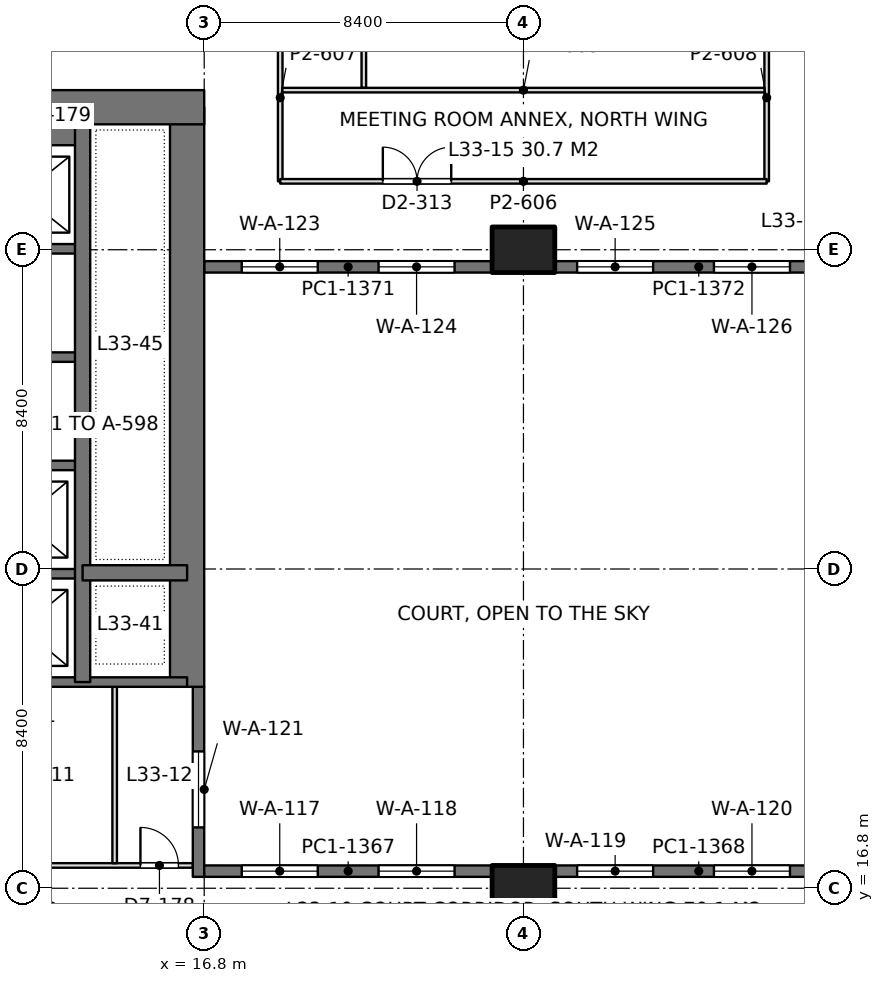
"""IFC4 building model, lengths in metres.
Left out: names, types, materials, properties, quantities, classifications, styles, units other than length and angle.
Written with IfcOpenShell. Run it as: python <this file> out.ifc"""

import sys

from ifc_helpers import new_model, si_unit, direction, frame, frame_2d, origin, origin_2d, place, context, subcontext, project, spatial, rectangle, extrude, element, fill, save


model = new_model("IFC4")
c1 = context("Model", 3, precision=1e-05, world=origin(), true_north=direction((0.0, 1.0)))
c2 = subcontext(c1, "Body", "Model", "MODEL_VIEW")
j1 = project(units=[si_unit("LENGTHUNIT", "METRE"), si_unit("PLANEANGLEUNIT", "RADIAN")], contexts=[c1])
p1 = place(None, origin())
s1 = spatial("IfcSite", under=j1, at=p1, CompositionType="ELEMENT")
p2 = place(p1, origin())
s2 = spatial("IfcBuilding", under=s1, at=p2, CompositionType="ELEMENT")
p3 = place(p2, frame((0.0, 0.0, 147.0)))
s3 = spatial("IfcBuildingStorey", under=s2, at=p3, CompositionType="ELEMENT", Elevation=147.0)
for number, where, z_axis, x_axis in (
    (1, (25.2, 16.8, 0.0), (0.0, 0.0, 1.0), (1.0, 0.0, 0.0)),
    (2, (25.2, 33.6, 0.0), (0.0, 0.0, 1.0), (1.0, 0.0, 0.0)),
):
    element("IfcColumn", number, at=place(p3, frame(where, z_axis=z_axis, x_axis=x_axis)), inside=s3, PredefinedType="COLUMN", context=c2, shape_type="SweptSolid", body=[
        extrude(rectangle(XDim=1.65, YDim=1.2, at=origin_2d()), origin(), (0.0, 0.0, 1.0), 4.2),
    ])
p4 = place(p3, frame((-1.2, 37.35, 0.0), z_axis=(0.0, 0.0, 1.0), x_axis=(1.0, 0.0, 0.0)))
e3 = element("IfcWall", 3, at=p4, inside=s3, PredefinedType="SHEAR", context=c2, shape_type="SweptSolid", body=[
    extrude(rectangle(XDim=18.0, YDim=0.9, at=frame_2d((9.0, 0.0))), origin(), (0.0, 0.0, 1.0), 4.2),
])
p5 = place(p4, frame((8.95, 0.0, 0.0)))
e4 = element("IfcOpeningElement", 4, at=p5, cuts=e3, PredefinedType="OPENING", context=c2, shape_type="SweptSolid", body=[
    extrude(rectangle(XDim=1.8, YDim=2.4, at=frame_2d((0.9, 1.2))), frame((0.0, 0.46, 0.0), z_axis=(0.0, -1.0, 0.0), x_axis=(1.0, 0.0, 0.0)), (0.0, 0.0, 1.0), 0.92),
])
p6 = place(p3, frame((16.35, 22.1, 0.0), z_axis=(0.0, 0.0, 1.0), x_axis=(0.0, 1.0, 0.0)))
e5 = element("IfcWall", 5, at=p6, inside=s3, PredefinedType="SHEAR", context=c2, shape_type="SweptSolid", body=[
    extrude(rectangle(XDim=15.25, YDim=0.9, at=frame_2d((7.625, 0.0))), origin(), (0.0, 0.0, 1.0), 4.2),
])
p7 = place(p3, frame((13.6, 22.225, 0.0), z_axis=(0.0, 0.0, 1.0), x_axis=(0.0, 1.0, 0.0)))
e6 = element("IfcWall", 6, at=p7, inside=s3, PredefinedType="SHEAR", context=c2, shape_type="SweptSolid", body=[
    extrude(rectangle(XDim=15.125, YDim=0.4, at=frame_2d((7.562, 0.0))), origin(), (0.0, 0.0, 1.0), 4.2),
])
p8 = place(p3, frame((13.6, 25.1, 0.0), z_axis=(0.0, 0.0, 1.0), x_axis=(1.0, 0.0, 0.0)))
e7 = element("IfcWall", 7, at=p8, inside=s3, PredefinedType="SHEAR", context=c2, shape_type="SweptSolid", body=[
    extrude(rectangle(XDim=2.75, YDim=0.4, at=frame_2d((1.375, 0.0))), origin(), (0.0, 0.0, 1.0), 4.2),
])
p9 = place(p3, frame((10.4, 22.225, 0.0), z_axis=(0.0, 0.0, 1.0), x_axis=(1.0, 0.0, 0.0)))
e8 = element("IfcWall", 8, at=p9, inside=s3, PredefinedType="SHEAR", context=c2, shape_type="SweptSolid", body=[
    extrude(rectangle(XDim=5.95, YDim=0.25, at=frame_2d((2.975, 0.0))), origin(), (0.0, 0.0, 1.0), 4.2),
])
for number, where, z_axis, x_axis in (
    (9, (10.4, 25.075, 0.0), (0.0, 0.0, 1.0), (1.0, 0.0, 0.0)),
    (10, (10.4, 27.925, 0.0), (0.0, 0.0, 1.0), (1.0, 0.0, 0.0)),
    (11, (10.4, 30.775, 0.0), (0.0, 0.0, 1.0), (1.0, 0.0, 0.0)),
    (12, (10.4, 33.625, 0.0), (0.0, 0.0, 1.0), (1.0, 0.0, 0.0)),
):
    element("IfcWall", number, at=place(p3, frame(where, z_axis=z_axis, x_axis=x_axis)), inside=s3, PredefinedType="SHEAR", context=c2, shape_type="SweptSolid", body=[
        extrude(rectangle(XDim=3.2, YDim=0.25, at=frame_2d((1.6, 0.0))), origin(), (0.0, 0.0, 1.0), 4.2),
    ])
p10 = place(p3, frame((10.4, 36.625, 0.0), z_axis=(0.0, 0.0, 1.0), x_axis=(1.0, 0.0, 0.0)))
e13 = element("IfcWall", 13, at=p10, inside=s3, PredefinedType="SHEAR", context=c2, shape_type="SweptSolid", body=[
    extrude(rectangle(XDim=3.2, YDim=0.55, at=frame_2d((1.6, 0.0))), origin(), (0.0, 0.0, 1.0), 4.2),
])
p11 = place(p3, frame((16.65, 17.1, 0.0), z_axis=(0.0, 0.0, 1.0), x_axis=(0.0, 1.0, 0.0)))
e14 = element("IfcWall", 14, at=p11, inside=s3, PredefinedType="SOLIDWALL", context=c2, shape_type="SweptSolid", body=[
    extrude(rectangle(XDim=5.0, YDim=0.3, at=frame_2d((2.5, 0.0))), origin(), (0.0, 0.0, 1.0), 4.05),
])
p12 = place(p11, frame((1.3, 0.0, 0.1)))
e15 = element("IfcOpeningElement", 15, at=p12, cuts=e14, PredefinedType="OPENING", context=c2, shape_type="SweptSolid", body=[
    extrude(rectangle(XDim=2.0, YDim=3.0, at=frame_2d((1.0, 1.5))), frame((0.0, 0.16, 0.0), z_axis=(0.0, -1.0, 0.0), x_axis=(1.0, 0.0, 0.0)), (0.0, 0.0, 1.0), 0.32),
])
p13 = place(p3, frame((16.8, 17.25, 0.0), z_axis=(0.0, 0.0, 1.0), x_axis=(1.0, 0.0, 0.0)))
e16 = element("IfcWall", 16, at=p13, inside=s3, PredefinedType="SOLIDWALL", context=c2, shape_type="SweptSolid", body=[
    extrude(rectangle(XDim=7.575, YDim=0.3, at=frame_2d((3.788, 0.0))), origin(), (0.0, 0.0, 1.0), 4.05),
])
p14 = place(p13, frame((0.988, 0.0, 0.1)))
e17 = element("IfcOpeningElement", 17, at=p14, cuts=e16, PredefinedType="OPENING", context=c2, shape_type="SweptSolid", body=[
    extrude(rectangle(XDim=2.0, YDim=3.0, at=frame_2d((1.0, 1.5))), frame((0.0, 0.16, 0.0), z_axis=(0.0, -1.0, 0.0), x_axis=(1.0, 0.0, 0.0)), (0.0, 0.0, 1.0), 0.32),
])
p15 = place(p13, frame((4.587, 0.0, 0.1)))
e18 = element("IfcOpeningElement", 18, at=p15, cuts=e16, PredefinedType="OPENING", context=c2, shape_type="SweptSolid", body=[
    extrude(rectangle(XDim=2.0, YDim=3.0, at=frame_2d((1.0, 1.5))), frame((0.0, 0.16, 0.0), z_axis=(0.0, -1.0, 0.0), x_axis=(1.0, 0.0, 0.0)), (0.0, 0.0, 1.0), 0.32),
])
p16 = place(p3, frame((26.025, 17.25, 0.0), z_axis=(0.0, 0.0, 1.0), x_axis=(1.0, 0.0, 0.0)))
e19 = element("IfcWall", 19, at=p16, inside=s3, PredefinedType="SOLIDWALL", context=c2, shape_type="SweptSolid", body=[
    extrude(rectangle(XDim=7.575, YDim=0.3, at=frame_2d((3.788, 0.0))), origin(), (0.0, 0.0, 1.0), 4.05),
])
p17 = place(p16, frame((0.587, 0.0, 0.1)))
e20 = element("IfcOpeningElement", 20, at=p17, cuts=e19, PredefinedType="OPENING", context=c2, shape_type="SweptSolid", body=[
    extrude(rectangle(XDim=2.0, YDim=3.0, at=frame_2d((1.0, 1.5))), frame((0.0, 0.16, 0.0), z_axis=(0.0, -1.0, 0.0), x_axis=(1.0, 0.0, 0.0)), (0.0, 0.0, 1.0), 0.32),
])
p18 = place(p16, frame((4.188, 0.0, 0.1)))
e21 = element("IfcOpeningElement", 21, at=p18, cuts=e19, PredefinedType="OPENING", context=c2, shape_type="SweptSolid", body=[
    extrude(rectangle(XDim=2.0, YDim=3.0, at=frame_2d((1.0, 1.5))), frame((0.0, 0.16, 0.0), z_axis=(0.0, -1.0, 0.0), x_axis=(1.0, 0.0, 0.0)), (0.0, 0.0, 1.0), 0.32),
])
p19 = place(p3, frame((16.8, 33.15, 0.0), z_axis=(0.0, 0.0, 1.0), x_axis=(1.0, 0.0, 0.0)))
e22 = element("IfcWall", 22, at=p19, inside=s3, PredefinedType="SOLIDWALL", context=c2, shape_type="SweptSolid", body=[
    extrude(rectangle(XDim=7.575, YDim=0.3, at=frame_2d((3.788, 0.0))), origin(), (0.0, 0.0, 1.0), 4.05),
])
p20 = place(p19, frame((0.988, 0.0, 0.1)))
e23 = element("IfcOpeningElement", 23, at=p20, cuts=e22, PredefinedType="OPENING", context=c2, shape_type="SweptSolid", body=[
    extrude(rectangle(XDim=2.0, YDim=3.0, at=frame_2d((1.0, 1.5))), frame((0.0, 0.16, 0.0), z_axis=(0.0, -1.0, 0.0), x_axis=(1.0, 0.0, 0.0)), (0.0, 0.0, 1.0), 0.32),
])
p21 = place(p19, frame((4.587, 0.0, 0.1)))
e24 = element("IfcOpeningElement", 24, at=p21, cuts=e22, PredefinedType="OPENING", context=c2, shape_type="SweptSolid", body=[
    extrude(rectangle(XDim=2.0, YDim=3.0, at=frame_2d((1.0, 1.5))), frame((0.0, 0.16, 0.0), z_axis=(0.0, -1.0, 0.0), x_axis=(1.0, 0.0, 0.0)), (0.0, 0.0, 1.0), 0.32),
])
p22 = place(p3, frame((26.025, 33.15, 0.0), z_axis=(0.0, 0.0, 1.0), x_axis=(1.0, 0.0, 0.0)))
e25 = element("IfcWall", 25, at=p22, inside=s3, PredefinedType="SOLIDWALL", context=c2, shape_type="SweptSolid", body=[
    extrude(rectangle(XDim=7.575, YDim=0.3, at=frame_2d((3.788, 0.0))), origin(), (0.0, 0.0, 1.0), 4.05),
])
p23 = place(p22, frame((0.587, 0.0, 0.1)))
e26 = element("IfcOpeningElement", 26, at=p23, cuts=e25, PredefinedType="OPENING", context=c2, shape_type="SweptSolid", body=[
    extrude(rectangle(XDim=2.0, YDim=3.0, at=frame_2d((1.0, 1.5))), frame((0.0, 0.16, 0.0), z_axis=(0.0, -1.0, 0.0), x_axis=(1.0, 0.0, 0.0)), (0.0, 0.0, 1.0), 0.32),
])
p24 = place(p22, frame((4.188, 0.0, 0.1)))
e27 = element("IfcOpeningElement", 27, at=p24, cuts=e25, PredefinedType="OPENING", context=c2, shape_type="SweptSolid", body=[
    extrude(rectangle(XDim=2.0, YDim=3.0, at=frame_2d((1.0, 1.5))), frame((0.0, 0.16, 0.0), z_axis=(0.0, -1.0, 0.0), x_axis=(1.0, 0.0, 0.0)), (0.0, 0.0, 1.0), 0.32),
])
p25 = place(p3, frame((10.598, 17.4, 0.0), z_axis=(0.0, 0.0, 1.0), x_axis=(1.0, 0.0, 0.0)))
e28 = element("IfcWall", 28, at=p25, inside=s3, PredefinedType="PARTITIONING", context=c2, shape_type="SweptSolid", body=[
    extrude(rectangle(XDim=5.904, YDim=0.12, at=frame_2d((2.952, 0.0))), origin(), (0.0, 0.0, 1.0), 3.55),
])
p26 = place(p25, frame((4.524, 0.0, 0.0)))
e29 = element("IfcOpeningElement", 29, at=p26, cuts=e28, PredefinedType="OPENING", context=c2, shape_type="SweptSolid", body=[
    extrude(rectangle(XDim=1.0, YDim=2.4, at=frame_2d((0.5, 1.2))), frame((0.0, 0.07, 0.0), z_axis=(0.0, -1.0, 0.0), x_axis=(1.0, 0.0, 0.0)), (0.0, 0.0, 1.0), 0.14),
])
p27 = place(p3, frame((14.444, 17.458, 0.0), z_axis=(0.0, 0.0, 1.0), x_axis=(0.0, 1.0, 0.0)))
e30 = element("IfcWall", 30, at=p27, inside=s3, PredefinedType="PARTITIONING", context=c2, shape_type="SweptSolid", body=[
    extrude(rectangle(XDim=4.644, YDim=0.12, at=frame_2d((2.322, 0.0))), origin(), (0.0, 0.0, 1.0), 3.6),
])
p28 = place(p3, frame((21.0, 37.858, 0.0), z_axis=(0.0, 0.0, 1.0), x_axis=(0.0, 1.0, 0.0)))
e31 = element("IfcWall", 31, at=p28, inside=s3, PredefinedType="PARTITIONING", context=c2, shape_type="SweptSolid", body=[
    extrude(rectangle(XDim=5.584, YDim=0.12, at=frame_2d((2.792, 0.0))), origin(), (0.0, 0.0, 1.0), 3.55),
])
for number, where, z_axis, x_axis in (
    (32, (18.8, 35.4, 0.0), (0.0, 0.0, 1.0), (0.0, 1.0, 0.0)),
    (33, (31.6, 35.4, 0.0), (0.0, 0.0, 1.0), (0.0, 1.0, 0.0)),
):
    element("IfcWall", number, at=place(p3, frame(where, z_axis=z_axis, x_axis=x_axis)), inside=s3, PredefinedType="PARTITIONING", context=c2, shape_type="SweptSolid", body=[
        extrude(rectangle(XDim=4.4, YDim=0.12, at=frame_2d((2.2, 0.0))), origin(), (0.0, 0.0, 1.0), 4.05),
    ])
p29 = place(p3, frame((18.8, 35.4, 0.0), z_axis=(0.0, 0.0, 1.0), x_axis=(1.0, 0.0, 0.0)))
e34 = element("IfcWall", 34, at=p29, inside=s3, PredefinedType="PARTITIONING", context=c2, shape_type="SweptSolid", body=[
    extrude(rectangle(XDim=12.8, YDim=0.12, at=frame_2d((6.4, 0.0))), origin(), (0.0, 0.0, 1.0), 3.55),
])
p30 = place(p29, frame((2.7, 0.0, 0.0)))
e35 = element("IfcOpeningElement", 35, at=p30, cuts=e34, PredefinedType="OPENING", context=c2, shape_type="SweptSolid", body=[
    extrude(rectangle(XDim=1.8, YDim=2.2, at=frame_2d((0.9, 1.1))), frame((0.0, 0.07, 0.0), z_axis=(0.0, -1.0, 0.0), x_axis=(1.0, 0.0, 0.0)), (0.0, 0.0, 1.0), 0.14),
])
p31 = place(p3, frame((18.858, 37.8, 0.0), z_axis=(0.0, 0.0, 1.0), x_axis=(1.0, 0.0, 0.0)))
e36 = element("IfcWall", 36, at=p31, inside=s3, PredefinedType="PARTITIONING", context=c2, shape_type="SweptSolid", body=[
    extrude(rectangle(XDim=12.684, YDim=0.12, at=frame_2d((6.342, 0.0))), origin(), (0.0, 0.0, 1.0), 3.55),
])
p32 = place(p12, origin())
e37 = element("IfcWindow", 37, at=p32, inside=s3, PartitioningType="SINGLE_PANEL", PredefinedType="WINDOW", context=c2, shape_type="SweptSolid", body=[
    extrude(rectangle(XDim=2.0, YDim=3.0, at=frame_2d((1.0, 1.5))), frame((0.0, 0.03, 0.0), z_axis=(0.0, -1.0, 0.0), x_axis=(1.0, 0.0, 0.0)), (0.0, 0.0, 1.0), 0.06),
])
fill(e15, e37)
p33 = place(p14, origin())
e38 = element("IfcWindow", 38, at=p33, inside=s3, PartitioningType="SINGLE_PANEL", PredefinedType="WINDOW", context=c2, shape_type="SweptSolid", body=[
    extrude(rectangle(XDim=2.0, YDim=3.0, at=frame_2d((1.0, 1.5))), frame((0.0, 0.03, 0.0), z_axis=(0.0, -1.0, 0.0), x_axis=(1.0, 0.0, 0.0)), (0.0, 0.0, 1.0), 0.06),
])
fill(e17, e38)
p34 = place(p15, origin())
e39 = element("IfcWindow", 39, at=p34, inside=s3, PartitioningType="SINGLE_PANEL", PredefinedType="WINDOW", context=c2, shape_type="SweptSolid", body=[
    extrude(rectangle(XDim=2.0, YDim=3.0, at=frame_2d((1.0, 1.5))), frame((0.0, 0.03, 0.0), z_axis=(0.0, -1.0, 0.0), x_axis=(1.0, 0.0, 0.0)), (0.0, 0.0, 1.0), 0.06),
])
fill(e18, e39)
p35 = place(p17, origin())
e40 = element("IfcWindow", 40, at=p35, inside=s3, PartitioningType="SINGLE_PANEL", PredefinedType="WINDOW", context=c2, shape_type="SweptSolid", body=[
    extrude(rectangle(XDim=2.0, YDim=3.0, at=frame_2d((1.0, 1.5))), frame((0.0, 0.03, 0.0), z_axis=(0.0, -1.0, 0.0), x_axis=(1.0, 0.0, 0.0)), (0.0, 0.0, 1.0), 0.06),
])
fill(e20, e40)
p36 = place(p18, origin())
e41 = element("IfcWindow", 41, at=p36, inside=s3, PartitioningType="SINGLE_PANEL", PredefinedType="WINDOW", context=c2, shape_type="SweptSolid", body=[
    extrude(rectangle(XDim=2.0, YDim=3.0, at=frame_2d((1.0, 1.5))), frame((0.0, 0.03, 0.0), z_axis=(0.0, -1.0, 0.0), x_axis=(1.0, 0.0, 0.0)), (0.0, 0.0, 1.0), 0.06),
])
fill(e21, e41)
p37 = place(p20, origin())
e42 = element("IfcWindow", 42, at=p37, inside=s3, PartitioningType="SINGLE_PANEL", PredefinedType="WINDOW", context=c2, shape_type="SweptSolid", body=[
    extrude(rectangle(XDim=2.0, YDim=3.0, at=frame_2d((1.0, 1.5))), frame((0.0, 0.03, 0.0), z_axis=(0.0, -1.0, 0.0), x_axis=(1.0, 0.0, 0.0)), (0.0, 0.0, 1.0), 0.06),
])
fill(e23, e42)
p38 = place(p21, origin())
e43 = element("IfcWindow", 43, at=p38, inside=s3, PartitioningType="SINGLE_PANEL", PredefinedType="WINDOW", context=c2, shape_type="SweptSolid", body=[
    extrude(rectangle(XDim=2.0, YDim=3.0, at=frame_2d((1.0, 1.5))), frame((0.0, 0.03, 0.0), z_axis=(0.0, -1.0, 0.0), x_axis=(1.0, 0.0, 0.0)), (0.0, 0.0, 1.0), 0.06),
])
fill(e24, e43)
p39 = place(p23, origin())
e44 = element("IfcWindow", 44, at=p39, inside=s3, PartitioningType="SINGLE_PANEL", PredefinedType="WINDOW", context=c2, shape_type="SweptSolid", body=[
    extrude(rectangle(XDim=2.0, YDim=3.0, at=frame_2d((1.0, 1.5))), frame((0.0, 0.03, 0.0), z_axis=(0.0, -1.0, 0.0), x_axis=(1.0, 0.0, 0.0)), (0.0, 0.0, 1.0), 0.06),
])
fill(e26, e44)
p40 = place(p24, origin())
e45 = element("IfcWindow", 45, at=p40, inside=s3, PartitioningType="SINGLE_PANEL", PredefinedType="WINDOW", context=c2, shape_type="SweptSolid", body=[
    extrude(rectangle(XDim=2.0, YDim=3.0, at=frame_2d((1.0, 1.5))), frame((0.0, 0.03, 0.0), z_axis=(0.0, -1.0, 0.0), x_axis=(1.0, 0.0, 0.0)), (0.0, 0.0, 1.0), 0.06),
])
fill(e27, e45)
p41 = place(p26, origin())
e46 = element("IfcDoor", 46, at=p41, inside=s3, OperationType="SINGLE_SWING_LEFT", PredefinedType="DOOR", context=c2, shape_type="SweptSolid", body=[
    extrude(rectangle(XDim=1.0, YDim=2.4, at=frame_2d((0.5, 1.2))), frame((0.0, 0.025, 0.0), z_axis=(0.0, -1.0, 0.0), x_axis=(1.0, 0.0, 0.0)), (0.0, 0.0, 1.0), 0.05),
])
fill(e29, e46)
p42 = place(p30, origin())
e47 = element("IfcDoor", 47, at=p42, inside=s3, OperationType="DOUBLE_DOOR_SINGLE_SWING", PredefinedType="DOOR", context=c2, shape_type="SweptSolid", body=[
    extrude(rectangle(XDim=1.8, YDim=2.2, at=frame_2d((0.9, 1.1))), frame((0.0, 0.025, 0.0), z_axis=(0.0, -1.0, 0.0), x_axis=(1.0, 0.0, 0.0)), (0.0, 0.0, 1.0), 0.05),
])
fill(e35, e47)
save(model, sys.argv[1])
